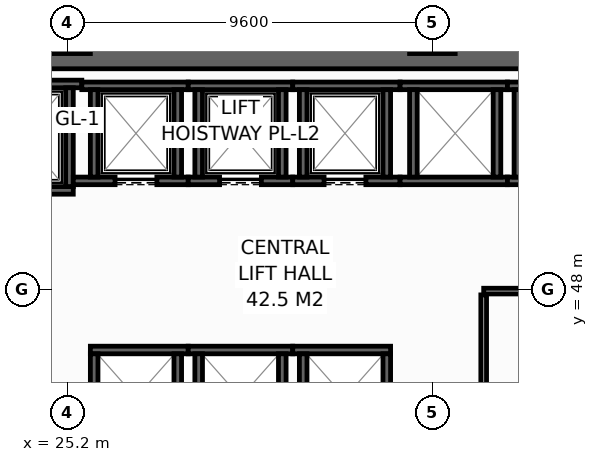
"""IFC4 building model, lengths in metres.
Left out: names, types, materials, properties, quantities, classifications, styles, units other than length and angle.
Written with IfcOpenShell. Run it as: python <this file> out.ifc"""

import sys

from ifc_helpers import new_model, si_unit, direction, frame, frame_2d, origin, origin_2d, place, context, subcontext, project, spatial, rectangle, hollow_rectangle, extrude, element, fill, save


model = new_model("IFC4")
c1 = context("Model", 3, precision=1e-05, world=origin(), true_north=direction((0.0, 1.0)))
c2 = subcontext(c1, "Body", "Model", "MODEL_VIEW")
j1 = project(units=[si_unit("LENGTHUNIT", "METRE"), si_unit("PLANEANGLEUNIT", "RADIAN")], contexts=[c1])
p1 = place(None, origin())
s1 = spatial("IfcSite", under=j1, at=p1, CompositionType="ELEMENT")
p2 = place(p1, origin())
s2 = spatial("IfcBuilding", under=s1, at=p2, CompositionType="ELEMENT")
p3 = place(p2, frame((0.0, 0.0, 64.8)))
s3 = spatial("IfcBuildingStorey", under=s2, at=p3, CompositionType="ELEMENT", Elevation=64.8)
p4 = place(p3, frame((13.5, 54.1, 0.0), z_axis=(0.0, 0.0, 1.0), x_axis=(1.0, 0.0, 0.0)))
e1 = element("IfcWall", 1, at=p4, inside=s3, PredefinedType="SHEAR", context=c2, shape_type="SweptSolid", body=[
    extrude(rectangle(XDim=32.9, YDim=0.6, at=frame_2d((16.45, 0.0))), origin(), (0.0, 0.0, 1.0), 4.15),
])
for number, where, z_axis, x_axis in (
    (2, (25.2, 54.8, 0.0), (0.0, 0.0, 1.0), (1.0, 0.0, 0.0)),
    (3, (34.8, 54.8, 0.0), (0.0, 0.0, 1.0), (1.0, 0.0, 0.0)),
):
    element("IfcColumn", number, at=place(p3, frame(where, z_axis=z_axis, x_axis=x_axis)), inside=s3, PredefinedType="COLUMN", context=c2, shape_type="SweptSolid", body=[
        extrude(hollow_rectangle(XDim=1.2, YDim=1.2, WallThickness=0.055, at=origin_2d()), origin(), (0.0, 0.0, 1.0), 4.4),
    ])
p5 = place(p3, frame((22.5, 50.6, 0.0), z_axis=(0.0, 0.0, 1.0), x_axis=(1.0, 0.0, 0.0)))
e4 = element("IfcWall", 4, at=p5, inside=s3, PredefinedType="SHEAR", context=c2, shape_type="SweptSolid", body=[
    extrude(rectangle(XDim=2.85, YDim=0.2, at=frame_2d((1.425, 0.0))), origin(), (0.0, 0.0, 1.0), 4.15),
])
p6 = place(p5, frame((0.925, 0.0, 0.0)))
e5 = element("IfcOpeningElement", 5, at=p6, cuts=e4, PredefinedType="OPENING", context=c2, shape_type="SweptSolid", body=[
    extrude(rectangle(XDim=1.25, YDim=2.3, at=frame_2d((0.625, 1.15))), frame((0.0, 0.11, 0.0), z_axis=(0.0, -1.0, 0.0), x_axis=(1.0, 0.0, 0.0)), (0.0, 0.0, 1.0), 0.22),
])
p7 = place(p3, frame((22.5, 53.4, 0.0), z_axis=(0.0, 0.0, 1.0), x_axis=(1.0, 0.0, 0.0)))
e6 = element("IfcWall", 6, at=p7, inside=s3, PredefinedType="SHEAR", context=c2, shape_type="SweptSolid", body=[
    extrude(rectangle(XDim=3.075, YDim=0.2, at=frame_2d((1.538, 0.0))), origin(), (0.0, 0.0, 1.0), 4.15),
])
p8 = place(p3, frame((25.25, 50.7, 0.0), z_axis=(0.0, 0.0, 1.0), x_axis=(0.0, 1.0, 0.0)))
e7 = element("IfcWall", 7, at=p8, inside=s3, PredefinedType="SHEAR", context=c2, shape_type="SweptSolid", body=[
    extrude(rectangle(XDim=2.6, YDim=0.2, at=frame_2d((1.3, 0.0))), origin(), (0.0, 0.0, 1.0), 4.15),
])
p9 = place(p3, frame((25.35, 50.85, 0.0), z_axis=(0.0, 0.0, 1.0), x_axis=(1.0, 0.0, 0.0)))
e8 = element("IfcWall", 8, at=p9, inside=s3, PredefinedType="SHEAR", context=c2, shape_type="SweptSolid", body=[
    extrude(rectangle(XDim=3.025, YDim=0.2, at=frame_2d((1.512, 0.0))), origin(), (0.0, 0.0, 1.0), 4.15),
])
p10 = place(p9, frame((1.1, 0.0, 0.0)))
e9 = element("IfcOpeningElement", 9, at=p10, cuts=e8, PredefinedType="OPENING", context=c2, shape_type="SweptSolid", body=[
    extrude(rectangle(XDim=1.1, YDim=2.2, at=frame_2d((0.55, 1.1))), frame((0.0, 0.11, 0.0), z_axis=(0.0, -1.0, 0.0), x_axis=(1.0, 0.0, 0.0)), (0.0, 0.0, 1.0), 0.22),
])
p11 = place(p3, frame((25.575, 53.35, 0.0), z_axis=(0.0, 0.0, 1.0), x_axis=(1.0, 0.0, 0.0)))
e10 = element("IfcWall", 10, at=p11, inside=s3, PredefinedType="SHEAR", context=c2, shape_type="SweptSolid", body=[
    extrude(rectangle(XDim=2.8, YDim=0.2, at=frame_2d((1.4, 0.0))), origin(), (0.0, 0.0, 1.0), 4.15),
])
for number, where, z_axis, x_axis in (
    (11, (25.9, 50.95, 0.0), (0.0, 0.0, 1.0), (0.0, 1.0, 0.0)),
    (12, (28.1, 50.95, 0.0), (0.0, 0.0, 1.0), (0.0, 1.0, 0.0)),
):
    element("IfcWall", number, at=place(p3, frame(where, z_axis=z_axis, x_axis=x_axis)), inside=s3, PredefinedType="SHEAR", context=c2, shape_type="SweptSolid", body=[
        extrude(rectangle(XDim=2.3, YDim=0.2, at=frame_2d((1.15, 0.0))), origin(), (0.0, 0.0, 1.0), 4.15),
    ])
p12 = place(p3, frame((28.375, 50.85, 0.0), z_axis=(0.0, 0.0, 1.0), x_axis=(1.0, 0.0, 0.0)))
e13 = element("IfcWall", 13, at=p12, inside=s3, PredefinedType="SHEAR", context=c2, shape_type="SweptSolid", body=[
    extrude(rectangle(XDim=2.75, YDim=0.2, at=frame_2d((1.375, 0.0))), origin(), (0.0, 0.0, 1.0), 4.15),
])
p13 = place(p12, frame((0.825, 0.0, 0.0)))
e14 = element("IfcOpeningElement", 14, at=p13, cuts=e13, PredefinedType="OPENING", context=c2, shape_type="SweptSolid", body=[
    extrude(rectangle(XDim=1.1, YDim=2.2, at=frame_2d((0.55, 1.1))), frame((0.0, 0.11, 0.0), z_axis=(0.0, -1.0, 0.0), x_axis=(1.0, 0.0, 0.0)), (0.0, 0.0, 1.0), 0.22),
])
p14 = place(p3, frame((28.375, 53.35, 0.0), z_axis=(0.0, 0.0, 1.0), x_axis=(1.0, 0.0, 0.0)))
e15 = element("IfcWall", 15, at=p14, inside=s3, PredefinedType="SHEAR", context=c2, shape_type="SweptSolid", body=[
    extrude(rectangle(XDim=2.75, YDim=0.2, at=frame_2d((1.375, 0.0))), origin(), (0.0, 0.0, 1.0), 4.15),
])
for number, where, z_axis, x_axis in (
    (16, (28.65, 50.95, 0.0), (0.0, 0.0, 1.0), (0.0, 1.0, 0.0)),
    (17, (30.85, 50.95, 0.0), (0.0, 0.0, 1.0), (0.0, 1.0, 0.0)),
):
    element("IfcWall", number, at=place(p3, frame(where, z_axis=z_axis, x_axis=x_axis)), inside=s3, PredefinedType="SHEAR", context=c2, shape_type="SweptSolid", body=[
        extrude(rectangle(XDim=2.3, YDim=0.2, at=frame_2d((1.15, 0.0))), origin(), (0.0, 0.0, 1.0), 4.15),
    ])
p15 = place(p3, frame((31.125, 50.85, 0.0), z_axis=(0.0, 0.0, 1.0), x_axis=(1.0, 0.0, 0.0)))
e18 = element("IfcWall", 18, at=p15, inside=s3, PredefinedType="SHEAR", context=c2, shape_type="SweptSolid", body=[
    extrude(rectangle(XDim=2.825, YDim=0.2, at=frame_2d((1.413, 0.0))), origin(), (0.0, 0.0, 1.0), 4.15),
])
p16 = place(p15, frame((0.825, 0.0, 0.0)))
e19 = element("IfcOpeningElement", 19, at=p16, cuts=e18, PredefinedType="OPENING", context=c2, shape_type="SweptSolid", body=[
    extrude(rectangle(XDim=1.1, YDim=2.2, at=frame_2d((0.55, 1.1))), frame((0.0, 0.11, 0.0), z_axis=(0.0, -1.0, 0.0), x_axis=(1.0, 0.0, 0.0)), (0.0, 0.0, 1.0), 0.22),
])
p17 = place(p3, frame((31.125, 53.35, 0.0), z_axis=(0.0, 0.0, 1.0), x_axis=(1.0, 0.0, 0.0)))
e20 = element("IfcWall", 20, at=p17, inside=s3, PredefinedType="SHEAR", context=c2, shape_type="SweptSolid", body=[
    extrude(rectangle(XDim=2.825, YDim=0.2, at=frame_2d((1.413, 0.0))), origin(), (0.0, 0.0, 1.0), 4.15),
])
for number, where, z_axis, x_axis in (
    (21, (31.4, 50.95, 0.0), (0.0, 0.0, 1.0), (0.0, 1.0, 0.0)),
    (22, (33.6, 50.95, 0.0), (0.0, 0.0, 1.0), (0.0, 1.0, 0.0)),
):
    element("IfcWall", number, at=place(p3, frame(where, z_axis=z_axis, x_axis=x_axis)), inside=s3, PredefinedType="SHEAR", context=c2, shape_type="SweptSolid", body=[
        extrude(rectangle(XDim=2.3, YDim=0.2, at=frame_2d((1.15, 0.0))), origin(), (0.0, 0.0, 1.0), 4.15),
    ])
p18 = place(p3, frame((25.8, 46.4, 0.0), z_axis=(0.0, 0.0, 1.0), x_axis=(1.0, 0.0, 0.0)))
e23 = element("IfcWall", 23, at=p18, inside=s3, PredefinedType="SHEAR", context=c2, shape_type="SweptSolid", body=[
    extrude(rectangle(XDim=2.575, YDim=0.2, at=frame_2d((1.288, 0.0))), origin(), (0.0, 0.0, 1.0), 4.15),
])
for number, where, z_axis, x_axis in (
    (24, (25.9, 44.0, 0.0), (0.0, 0.0, 1.0), (0.0, 1.0, 0.0)),
    (25, (28.1, 44.0, 0.0), (0.0, 0.0, 1.0), (0.0, 1.0, 0.0)),
):
    element("IfcWall", number, at=place(p3, frame(where, z_axis=z_axis, x_axis=x_axis)), inside=s3, PredefinedType="SHEAR", context=c2, shape_type="SweptSolid", body=[
        extrude(rectangle(XDim=2.3, YDim=0.2, at=frame_2d((1.15, 0.0))), origin(), (0.0, 0.0, 1.0), 4.15),
    ])
p19 = place(p3, frame((28.375, 46.4, 0.0), z_axis=(0.0, 0.0, 1.0), x_axis=(1.0, 0.0, 0.0)))
e26 = element("IfcWall", 26, at=p19, inside=s3, PredefinedType="SHEAR", context=c2, shape_type="SweptSolid", body=[
    extrude(rectangle(XDim=2.75, YDim=0.2, at=frame_2d((1.375, 0.0))), origin(), (0.0, 0.0, 1.0), 4.15),
])
for number, where, z_axis, x_axis in (
    (27, (28.65, 44.0, 0.0), (0.0, 0.0, 1.0), (0.0, 1.0, 0.0)),
    (28, (30.85, 44.0, 0.0), (0.0, 0.0, 1.0), (0.0, 1.0, 0.0)),
):
    element("IfcWall", number, at=place(p3, frame(where, z_axis=z_axis, x_axis=x_axis)), inside=s3, PredefinedType="SHEAR", context=c2, shape_type="SweptSolid", body=[
        extrude(rectangle(XDim=2.3, YDim=0.2, at=frame_2d((1.15, 0.0))), origin(), (0.0, 0.0, 1.0), 4.15),
    ])
p20 = place(p3, frame((31.125, 46.4, 0.0), z_axis=(0.0, 0.0, 1.0), x_axis=(1.0, 0.0, 0.0)))
e29 = element("IfcWall", 29, at=p20, inside=s3, PredefinedType="SHEAR", context=c2, shape_type="SweptSolid", body=[
    extrude(rectangle(XDim=2.575, YDim=0.2, at=frame_2d((1.288, 0.0))), origin(), (0.0, 0.0, 1.0), 4.15),
])
for number, where, z_axis, x_axis in (
    (30, (31.4, 44.0, 0.0), (0.0, 0.0, 1.0), (0.0, 1.0, 0.0)),
    (31, (33.6, 44.0, 0.0), (0.0, 0.0, 1.0), (0.0, 1.0, 0.0)),
):
    element("IfcWall", number, at=place(p3, frame(where, z_axis=z_axis, x_axis=x_axis)), inside=s3, PredefinedType="SHEAR", context=c2, shape_type="SweptSolid", body=[
        extrude(rectangle(XDim=2.3, YDim=0.2, at=frame_2d((1.15, 0.0))), origin(), (0.0, 0.0, 1.0), 4.15),
    ])
for number, where, z_axis, x_axis in (
    (32, (33.95, 50.85, 0.0), (0.0, 0.0, 1.0), (1.0, 0.0, 0.0)),
    (33, (33.95, 53.35, 0.0), (0.0, 0.0, 1.0), (1.0, 0.0, 0.0)),
):
    element("IfcWall", number, at=place(p3, frame(where, z_axis=z_axis, x_axis=x_axis)), inside=s3, PredefinedType="SHEAR", context=c2, shape_type="SweptSolid", body=[
        extrude(rectangle(XDim=2.825, YDim=0.2, at=frame_2d((1.413, 0.0))), origin(), (0.0, 0.0, 1.0), 4.15),
    ])
for number, where, z_axis, x_axis in (
    (34, (34.3, 50.95, 0.0), (0.0, 0.0, 1.0), (0.0, 1.0, 0.0)),
    (35, (36.5, 50.95, 0.0), (0.0, 0.0, 1.0), (0.0, 1.0, 0.0)),
):
    element("IfcWall", number, at=place(p3, frame(where, z_axis=z_axis, x_axis=x_axis)), inside=s3, PredefinedType="SHEAR", context=c2, shape_type="SweptSolid", body=[
        extrude(rectangle(XDim=2.3, YDim=0.2, at=frame_2d((1.15, 0.0))), origin(), (0.0, 0.0, 1.0), 4.15),
    ])
for number, where, z_axis, x_axis in (
    (36, (36.775, 50.85, 0.0), (0.0, 0.0, 1.0), (1.0, 0.0, 0.0)),
    (37, (36.775, 53.35, 0.0), (0.0, 0.0, 1.0), (1.0, 0.0, 0.0)),
):
    element("IfcWall", number, at=place(p3, frame(where, z_axis=z_axis, x_axis=x_axis)), inside=s3, PredefinedType="SHEAR", context=c2, shape_type="SweptSolid", body=[
        extrude(rectangle(XDim=2.75, YDim=0.2, at=frame_2d((1.375, 0.0))), origin(), (0.0, 0.0, 1.0), 4.15),
    ])
p21 = place(p3, frame((37.05, 50.95, 0.0), z_axis=(0.0, 0.0, 1.0), x_axis=(0.0, 1.0, 0.0)))
e38 = element("IfcWall", 38, at=p21, inside=s3, PredefinedType="SHEAR", context=c2, shape_type="SweptSolid", body=[
    extrude(rectangle(XDim=2.3, YDim=0.2, at=frame_2d((1.15, 0.0))), origin(), (0.0, 0.0, 1.0), 4.15),
])
p22 = place(p3, frame((36.15, 47.95, 0.0), z_axis=(0.0, 0.0, 1.0), x_axis=(1.0, 0.0, 0.0)))
e39 = element("IfcWall", 39, at=p22, inside=s3, PredefinedType="PARTITIONING", context=c2, shape_type="SweptSolid", body=[
    extrude(rectangle(XDim=6.35, YDim=0.15, at=frame_2d((3.175, 0.0))), origin(), (0.0, 0.0, 1.0), 4.15),
])
p23 = place(p3, frame((36.15, 45.22, 0.0), z_axis=(0.0, 0.0, 1.0), x_axis=(0.0, 1.0, 0.0)))
e40 = element("IfcWall", 40, at=p23, inside=s3, PredefinedType="PARTITIONING", context=c2, shape_type="SweptSolid", body=[
    extrude(rectangle(XDim=2.63, YDim=0.15, at=frame_2d((1.315, 0.0))), origin(), (0.0, 0.0, 1.0), 4.15),
])
p24 = place(p10, origin())
e41 = element("IfcDoor", 41, at=p24, inside=s3, OperationType="SLIDING_TO_LEFT", PredefinedType="DOOR", context=c2, shape_type="SweptSolid", body=[
    extrude(rectangle(XDim=1.1, YDim=2.2, at=frame_2d((0.55, 1.1))), frame((0.0, 0.025, 0.0), z_axis=(0.0, -1.0, 0.0), x_axis=(1.0, 0.0, 0.0)), (0.0, 0.0, 1.0), 0.05),
])
fill(e9, e41)
p25 = place(p13, origin())
e42 = element("IfcDoor", 42, at=p25, inside=s3, OperationType="SLIDING_TO_LEFT", PredefinedType="DOOR", context=c2, shape_type="SweptSolid", body=[
    extrude(rectangle(XDim=1.1, YDim=2.2, at=frame_2d((0.55, 1.1))), frame((0.0, 0.025, 0.0), z_axis=(0.0, -1.0, 0.0), x_axis=(1.0, 0.0, 0.0)), (0.0, 0.0, 1.0), 0.05),
])
fill(e14, e42)
p26 = place(p16, origin())
e43 = element("IfcDoor", 43, at=p26, inside=s3, OperationType="SLIDING_TO_LEFT", PredefinedType="DOOR", context=c2, shape_type="SweptSolid", body=[
    extrude(rectangle(XDim=1.1, YDim=2.2, at=frame_2d((0.55, 1.1))), frame((0.0, 0.025, 0.0), z_axis=(0.0, -1.0, 0.0), x_axis=(1.0, 0.0, 0.0)), (0.0, 0.0, 1.0), 0.05),
])
fill(e19, e43)
save(model, sys.argv[1])
